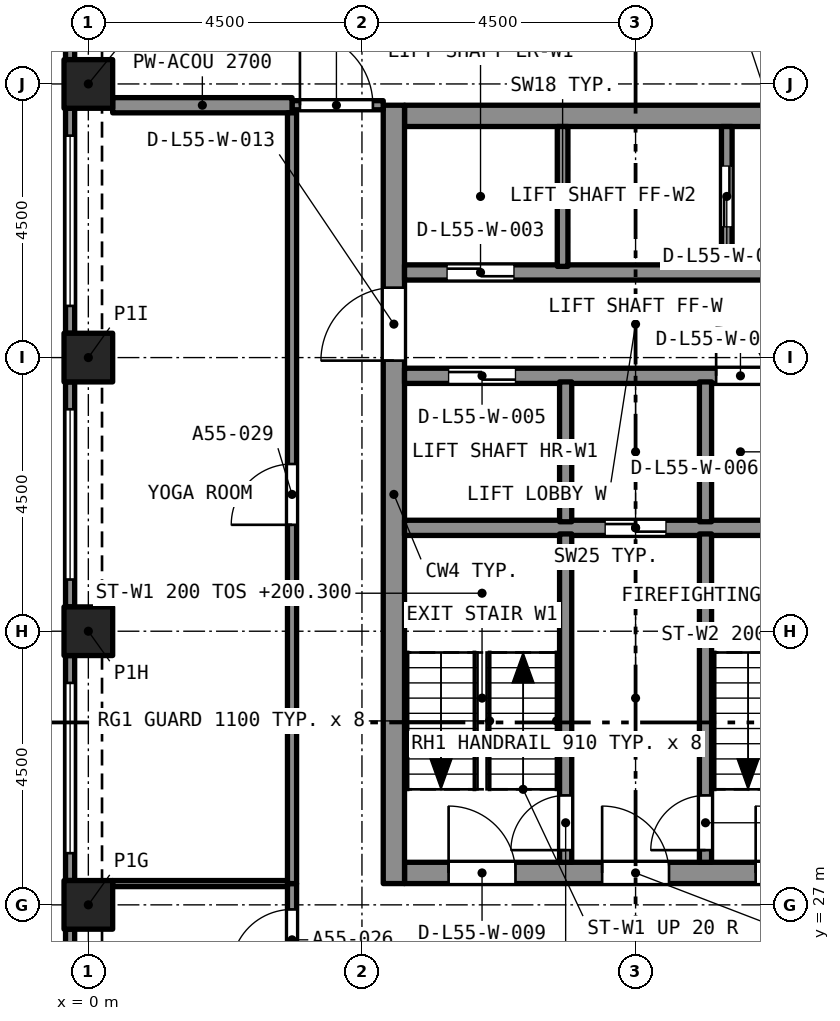
"""IFC4 building model, lengths in metres.
Left out: names, types, materials, properties, quantities, classifications, styles, units other than length and angle.
Written with IfcOpenShell. Run it as: python <this file> out.ifc"""

import sys

from ifc_helpers import new_model, si_unit, direction, frame, frame_2d, origin, origin_2d, place, context, subcontext, project, spatial, rectangle, extrude, element, fill, save


model = new_model("IFC4")
c1 = context("Model", 3, precision=1e-05, world=origin(), true_north=direction((0.0, 1.0)))
c2 = subcontext(c1, "Body", "Model", "MODEL_VIEW")
j1 = project(units=[si_unit("LENGTHUNIT", "METRE"), si_unit("PLANEANGLEUNIT", "RADIAN")], contexts=[c1])
p1 = place(None, origin())
s1 = spatial("IfcSite", under=j1, at=p1, CompositionType="ELEMENT")
p2 = place(p1, origin())
s2 = spatial("IfcBuilding", under=s1, at=p2, CompositionType="ELEMENT")
p3 = place(p2, frame((0.0, 0.0, 198.7)))
s3 = spatial("IfcBuildingStorey", under=s2, at=p3, CompositionType="ELEMENT", Elevation=198.7)
for number, where, z_axis, x_axis in (
    (1, (0.0, 27.0, 0.0), (0.0, 0.0, 1.0), (1.0, 0.0, 0.0)),
    (2, (0.0, 31.5, 0.0), (0.0, 0.0, 1.0), (1.0, 0.0, 0.0)),
    (3, (0.0, 36.0, 0.0), (0.0, 0.0, 1.0), (1.0, 0.0, 0.0)),
    (4, (0.0, 40.5, 0.0), (0.0, 0.0, 1.0), (1.0, 0.0, 0.0)),
):
    element("IfcColumn", number, at=place(p3, frame(where, z_axis=z_axis, x_axis=x_axis)), inside=s3, PredefinedType="COLUMN", context=c2, shape_type="SweptSolid", body=[
        extrude(rectangle(XDim=0.8, YDim=0.8, at=origin_2d()), origin(), (0.0, 0.0, 1.0), 3.2),
    ])
p4 = place(p3, frame((5.2, 27.525, 0.0), z_axis=(0.0, 0.0, 1.0), x_axis=(1.0, 0.0, 0.0)))
e5 = element("IfcWall", 5, at=p4, inside=s3, PredefinedType="SOLIDWALL", context=c2, shape_type="SweptSolid", body=[
    extrude(rectangle(XDim=7.6, YDim=0.35, at=frame_2d((3.8, 0.0))), origin(), (0.0, 0.0, 1.0), 3.2),
])
p5 = place(p4, frame((0.725, 0.0, 0.0)))
e6 = element("IfcOpeningElement", 6, at=p5, cuts=e5, PredefinedType="OPENING", context=c2, shape_type="SweptSolid", body=[
    extrude(rectangle(XDim=1.1, YDim=2.1, at=frame_2d((0.55, 1.05))), frame((0.0, 0.185, 0.0), z_axis=(0.0, -1.0, 0.0), x_axis=(1.0, 0.0, 0.0)), (0.0, 0.0, 1.0), 0.37),
])
p6 = place(p4, frame((3.25, 0.0, 0.0)))
e7 = element("IfcOpeningElement", 7, at=p6, cuts=e5, PredefinedType="OPENING", context=c2, shape_type="SweptSolid", body=[
    extrude(rectangle(XDim=1.1, YDim=2.1, at=frame_2d((0.55, 1.05))), frame((0.0, 0.185, 0.0), z_axis=(0.0, -1.0, 0.0), x_axis=(1.0, 0.0, 0.0)), (0.0, 0.0, 1.0), 0.37),
])
p7 = place(p4, frame((5.775, 0.0, 0.0)))
e8 = element("IfcOpeningElement", 8, at=p7, cuts=e5, PredefinedType="OPENING", context=c2, shape_type="SweptSolid", body=[
    extrude(rectangle(XDim=1.1, YDim=2.1, at=frame_2d((0.55, 1.05))), frame((0.0, 0.185, 0.0), z_axis=(0.0, -1.0, 0.0), x_axis=(1.0, 0.0, 0.0)), (0.0, 0.0, 1.0), 0.37),
])
p8 = place(p3, frame((5.2, 39.975, 0.0), z_axis=(0.0, 0.0, 1.0), x_axis=(1.0, 0.0, 0.0)))
e9 = element("IfcWall", 9, at=p8, inside=s3, PredefinedType="SOLIDWALL", context=c2, shape_type="SweptSolid", body=[
    extrude(rectangle(XDim=7.6, YDim=0.35, at=frame_2d((3.8, 0.0))), origin(), (0.0, 0.0, 1.0), 3.2),
])
p9 = place(p3, frame((5.025, 27.35, 0.0), z_axis=(0.0, 0.0, 1.0), x_axis=(0.0, 1.0, 0.0)))
e10 = element("IfcWall", 10, at=p9, inside=s3, PredefinedType="SOLIDWALL", context=c2, shape_type="SweptSolid", body=[
    extrude(rectangle(XDim=12.8, YDim=0.35, at=frame_2d((6.4, 0.0))), origin(), (0.0, 0.0, 1.0), 3.2),
])
p10 = place(p9, frame((8.6, 0.0, 0.0)))
e11 = element("IfcOpeningElement", 11, at=p10, cuts=e10, PredefinedType="OPENING", context=c2, shape_type="SweptSolid", body=[
    extrude(rectangle(XDim=1.2, YDim=2.1, at=frame_2d((0.6, 1.05))), frame((0.0, 0.185, 0.0), z_axis=(0.0, -1.0, 0.0), x_axis=(1.0, 0.0, 0.0)), (0.0, 0.0, 1.0), 0.37),
])
p11 = place(p3, frame((-0.3, 40.9, 0.0), z_axis=(0.0, 0.0, 1.0), x_axis=(0.0, 1.0, 0.0)))
e12 = element("IfcWall", 12, at=p11, inside=s3, PredefinedType="SOLIDWALL", context=c2, shape_type="SweptSolid", body=[
    extrude(rectangle(XDim=3.7, YDim=0.15, at=frame_2d((1.85, 0.0))), origin(), (0.0, 0.0, 1.0), 3.2),
])
p12 = place(p11, frame((0.45, 0.0, 0.45)))
e13 = element("IfcOpeningElement", 13, at=p12, cuts=e12, PredefinedType="OPENING", context=c2, shape_type="SweptSolid", body=[
    extrude(rectangle(XDim=2.8, YDim=1.95, at=frame_2d((1.4, 0.975))), frame((0.0, 0.085, 0.0), z_axis=(0.0, -1.0, 0.0), x_axis=(1.0, 0.0, 0.0)), (0.0, 0.0, 1.0), 0.17),
])
p13 = place(p3, frame((-0.3, 36.4, 0.0), z_axis=(0.0, 0.0, 1.0), x_axis=(0.0, 1.0, 0.0)))
e14 = element("IfcWall", 14, at=p13, inside=s3, PredefinedType="SOLIDWALL", context=c2, shape_type="SweptSolid", body=[
    extrude(rectangle(XDim=3.7, YDim=0.15, at=frame_2d((1.85, 0.0))), origin(), (0.0, 0.0, 1.0), 3.2),
])
p14 = place(p13, frame((0.45, 0.0, 0.45)))
e15 = element("IfcOpeningElement", 15, at=p14, cuts=e14, PredefinedType="OPENING", context=c2, shape_type="SweptSolid", body=[
    extrude(rectangle(XDim=2.8, YDim=1.95, at=frame_2d((1.4, 0.975))), frame((0.0, 0.085, 0.0), z_axis=(0.0, -1.0, 0.0), x_axis=(1.0, 0.0, 0.0)), (0.0, 0.0, 1.0), 0.17),
])
p15 = place(p3, frame((-0.3, 31.9, 0.0), z_axis=(0.0, 0.0, 1.0), x_axis=(0.0, 1.0, 0.0)))
e16 = element("IfcWall", 16, at=p15, inside=s3, PredefinedType="SOLIDWALL", context=c2, shape_type="SweptSolid", body=[
    extrude(rectangle(XDim=3.7, YDim=0.15, at=frame_2d((1.85, 0.0))), origin(), (0.0, 0.0, 1.0), 3.2),
])
p16 = place(p15, frame((0.45, 0.0, 0.45)))
e17 = element("IfcOpeningElement", 17, at=p16, cuts=e16, PredefinedType="OPENING", context=c2, shape_type="SweptSolid", body=[
    extrude(rectangle(XDim=2.8, YDim=1.95, at=frame_2d((1.4, 0.975))), frame((0.0, 0.085, 0.0), z_axis=(0.0, -1.0, 0.0), x_axis=(1.0, 0.0, 0.0)), (0.0, 0.0, 1.0), 0.17),
])
p17 = place(p3, frame((-0.3, 27.4, 0.0), z_axis=(0.0, 0.0, 1.0), x_axis=(0.0, 1.0, 0.0)))
e18 = element("IfcWall", 18, at=p17, inside=s3, PredefinedType="SOLIDWALL", context=c2, shape_type="SweptSolid", body=[
    extrude(rectangle(XDim=3.7, YDim=0.15, at=frame_2d((1.85, 0.0))), origin(), (0.0, 0.0, 1.0), 3.2),
])
p18 = place(p17, frame((0.45, 0.0, 0.45)))
e19 = element("IfcOpeningElement", 19, at=p18, cuts=e18, PredefinedType="OPENING", context=c2, shape_type="SweptSolid", body=[
    extrude(rectangle(XDim=2.8, YDim=1.95, at=frame_2d((1.4, 0.975))), frame((0.0, 0.085, 0.0), z_axis=(0.0, -1.0, 0.0), x_axis=(1.0, 0.0, 0.0)), (0.0, 0.0, 1.0), 0.17),
])
p19 = place(p3, frame((-0.3, 22.9, 0.0), z_axis=(0.0, 0.0, 1.0), x_axis=(0.0, 1.0, 0.0)))
e20 = element("IfcWall", 20, at=p19, inside=s3, PredefinedType="SOLIDWALL", context=c2, shape_type="SweptSolid", body=[
    extrude(rectangle(XDim=3.7, YDim=0.15, at=frame_2d((1.85, 0.0))), origin(), (0.0, 0.0, 1.0), 3.2),
])
p20 = place(p19, frame((0.45, 0.0, 0.45)))
e21 = element("IfcOpeningElement", 21, at=p20, cuts=e20, PredefinedType="OPENING", context=c2, shape_type="SweptSolid", body=[
    extrude(rectangle(XDim=2.8, YDim=1.95, at=frame_2d((1.4, 0.975))), frame((0.0, 0.085, 0.0), z_axis=(0.0, -1.0, 0.0), x_axis=(1.0, 0.0, 0.0)), (0.0, 0.0, 1.0), 0.17),
])
p21 = place(p3, frame((3.35, 40.15, 0.0), z_axis=(0.0, 0.0, 1.0), x_axis=(1.0, 0.0, 0.0)))
e22 = element("IfcWall", 22, at=p21, inside=s3, PredefinedType="PARTITIONING", context=c2, shape_type="SweptSolid", body=[
    extrude(rectangle(XDim=1.5, YDim=0.15, at=frame_2d((0.75, 0.0))), origin(), (0.0, 0.0, 1.0), 2.7),
])
p22 = place(p21, frame((0.13, 0.0, 0.0)))
e23 = element("IfcOpeningElement", 23, at=p22, cuts=e22, PredefinedType="OPENING", context=c2, shape_type="SweptSolid", body=[
    extrude(rectangle(XDim=1.2, YDim=2.4, at=frame_2d((0.6, 1.2))), frame((0.0, 0.085, 0.0), z_axis=(0.0, -1.0, 0.0), x_axis=(1.0, 0.0, 0.0)), (0.0, 0.0, 1.0), 0.17),
])
p23 = place(p3, frame((0.4, 40.15, 0.0), z_axis=(0.0, 0.0, 1.0), x_axis=(1.0, 0.0, 0.0)))
e24 = element("IfcWall", 24, at=p23, inside=s3, PredefinedType="PARTITIONING", context=c2, shape_type="SweptSolid", body=[
    extrude(rectangle(XDim=2.95, YDim=0.25, at=frame_2d((1.475, 0.0))), origin(), (0.0, 0.0, 1.0), 2.7),
])
p24 = place(p3, frame((3.35, 25.425, 0.0), z_axis=(0.0, 0.0, 1.0), x_axis=(0.0, 1.0, 0.0)))
e25 = element("IfcWall", 25, at=p24, inside=s3, PredefinedType="PARTITIONING", context=c2, shape_type="SweptSolid", body=[
    extrude(rectangle(XDim=1.925, YDim=0.15, at=frame_2d((0.962, 0.0))), origin(), (0.0, 0.0, 1.0), 2.7),
])
p25 = place(p24, frame((0.5, 0.0, 0.0)))
e26 = element("IfcOpeningElement", 26, at=p25, cuts=e25, PredefinedType="OPENING", context=c2, shape_type="SweptSolid", body=[
    extrude(rectangle(XDim=1.0, YDim=2.1, at=frame_2d((0.5, 1.05))), frame((0.0, 0.085, 0.0), z_axis=(0.0, -1.0, 0.0), x_axis=(1.0, 0.0, 0.0)), (0.0, 0.0, 1.0), 0.17),
])
p26 = place(p3, frame((3.35, 27.35, 0.0), z_axis=(0.0, 0.0, 1.0), x_axis=(0.0, 1.0, 0.0)))
e27 = element("IfcWall", 27, at=p26, inside=s3, PredefinedType="PARTITIONING", context=c2, shape_type="SweptSolid", body=[
    extrude(rectangle(XDim=12.675, YDim=0.15, at=frame_2d((6.337, 0.0))), origin(), (0.0, 0.0, 1.0), 2.7),
])
p27 = place(p26, frame((5.9, 0.0, 0.0)))
e28 = element("IfcOpeningElement", 28, at=p27, cuts=e27, PredefinedType="OPENING", context=c2, shape_type="SweptSolid", body=[
    extrude(rectangle(XDim=1.0, YDim=2.1, at=frame_2d((0.5, 1.05))), frame((0.0, 0.085, 0.0), z_axis=(0.0, -1.0, 0.0), x_axis=(1.0, 0.0, 0.0)), (0.0, 0.0, 1.0), 0.17),
])
p28 = place(p3, frame((0.4, 27.35, 0.0), z_axis=(0.0, 0.0, 1.0), x_axis=(1.0, 0.0, 0.0)))
e29 = element("IfcWall", 29, at=p28, inside=s3, PredefinedType="PARTITIONING", context=c2, shape_type="SweptSolid", body=[
    extrude(rectangle(XDim=2.875, YDim=0.1, at=frame_2d((1.438, 0.0))), origin(), (0.0, 0.0, 1.0), 2.7),
])
p29 = place(p3, frame((5.2, 33.2, 0.0), z_axis=(0.0, 0.0, 1.0), x_axis=(1.0, 0.0, 0.0)))
e30 = element("IfcWall", 30, at=p29, inside=s3, PredefinedType="SOLIDWALL", context=c2, shape_type="SweptSolid", body=[
    extrude(rectangle(XDim=7.6, YDim=0.25, at=frame_2d((3.8, 0.0))), origin(), (0.0, 0.0, 1.0), 2.7),
])
p30 = place(p29, frame((3.3, 0.0, 0.0)))
e31 = element("IfcOpeningElement", 31, at=p30, cuts=e30, PredefinedType="OPENING", context=c2, shape_type="SweptSolid", body=[
    extrude(rectangle(XDim=1.0, YDim=2.1, at=frame_2d((0.5, 1.05))), frame((0.0, 0.135, 0.0), z_axis=(0.0, -1.0, 0.0), x_axis=(1.0, 0.0, 0.0)), (0.0, 0.0, 1.0), 0.27),
])
p31 = place(p3, frame((5.2, 35.7, 0.0), z_axis=(0.0, 0.0, 1.0), x_axis=(1.0, 0.0, 0.0)))
e32 = element("IfcWall", 32, at=p31, inside=s3, PredefinedType="SOLIDWALL", context=c2, shape_type="SweptSolid", body=[
    extrude(rectangle(XDim=7.6, YDim=0.25, at=frame_2d((3.8, 0.0))), origin(), (0.0, 0.0, 1.0), 2.7),
])
p32 = place(p31, frame((0.725, 0.0, 0.0)))
e33 = element("IfcOpeningElement", 33, at=p32, cuts=e32, PredefinedType="OPENING", context=c2, shape_type="SweptSolid", body=[
    extrude(rectangle(XDim=1.1, YDim=2.4, at=frame_2d((0.55, 1.2))), frame((0.0, 0.135, 0.0), z_axis=(0.0, -1.0, 0.0), x_axis=(1.0, 0.0, 0.0)), (0.0, 0.0, 1.0), 0.27),
])
p33 = place(p31, frame((5.125, 0.0, 0.0)))
e34 = element("IfcOpeningElement", 34, at=p33, cuts=e32, PredefinedType="OPENING", context=c2, shape_type="SweptSolid", body=[
    extrude(rectangle(XDim=0.8, YDim=2.1, at=frame_2d((0.4, 1.05))), frame((0.0, 0.135, 0.0), z_axis=(0.0, -1.0, 0.0), x_axis=(1.0, 0.0, 0.0)), (0.0, 0.0, 1.0), 0.27),
])
p34 = place(p31, frame((6.45, 0.0, 0.0)))
e35 = element("IfcOpeningElement", 35, at=p34, cuts=e32, PredefinedType="OPENING", context=c2, shape_type="SweptSolid", body=[
    extrude(rectangle(XDim=0.9, YDim=2.1, at=frame_2d((0.45, 1.05))), frame((0.0, 0.135, 0.0), z_axis=(0.0, -1.0, 0.0), x_axis=(1.0, 0.0, 0.0)), (0.0, 0.0, 1.0), 0.27),
])
p35 = place(p3, frame((5.2, 37.4, 0.0), z_axis=(0.0, 0.0, 1.0), x_axis=(1.0, 0.0, 0.0)))
e36 = element("IfcWall", 36, at=p35, inside=s3, PredefinedType="SOLIDWALL", context=c2, shape_type="SweptSolid", body=[
    extrude(rectangle(XDim=7.6, YDim=0.25, at=frame_2d((3.8, 0.0))), origin(), (0.0, 0.0, 1.0), 2.7),
])
p36 = place(p35, frame((0.7, 0.0, 0.0)))
e37 = element("IfcOpeningElement", 37, at=p36, cuts=e36, PredefinedType="OPENING", context=c2, shape_type="SweptSolid", body=[
    extrude(rectangle(XDim=1.1, YDim=2.4, at=frame_2d((0.55, 1.2))), frame((0.0, 0.135, 0.0), z_axis=(0.0, -1.0, 0.0), x_axis=(1.0, 0.0, 0.0)), (0.0, 0.0, 1.0), 0.27),
])
p37 = place(p3, frame((7.85, 27.7, 0.0), z_axis=(0.0, 0.0, 1.0), x_axis=(0.0, 1.0, 0.0)))
e38 = element("IfcWall", 38, at=p37, inside=s3, PredefinedType="SOLIDWALL", context=c2, shape_type="SweptSolid", body=[
    extrude(rectangle(XDim=5.4, YDim=0.2, at=frame_2d((2.7, 0.0))), origin(), (0.0, 0.0, 1.0), 2.7),
])
p38 = place(p37, frame((0.2, 0.0, 0.0)))
e39 = element("IfcOpeningElement", 39, at=p38, cuts=e38, PredefinedType="OPENING", context=c2, shape_type="SweptSolid", body=[
    extrude(rectangle(XDim=0.9, YDim=2.1, at=frame_2d((0.45, 1.05))), frame((0.0, 0.11, 0.0), z_axis=(0.0, -1.0, 0.0), x_axis=(1.0, 0.0, 0.0)), (0.0, 0.0, 1.0), 0.22),
])
p39 = place(p3, frame((10.15, 27.7, 0.0), z_axis=(0.0, 0.0, 1.0), x_axis=(0.0, 1.0, 0.0)))
e40 = element("IfcWall", 40, at=p39, inside=s3, PredefinedType="SOLIDWALL", context=c2, shape_type="SweptSolid", body=[
    extrude(rectangle(XDim=5.4, YDim=0.2, at=frame_2d((2.7, 0.0))), origin(), (0.0, 0.0, 1.0), 2.7),
])
p40 = place(p39, frame((0.2, 0.0, 0.0)))
e41 = element("IfcOpeningElement", 41, at=p40, cuts=e40, PredefinedType="OPENING", context=c2, shape_type="SweptSolid", body=[
    extrude(rectangle(XDim=0.9, YDim=2.1, at=frame_2d((0.45, 1.05))), frame((0.0, 0.11, 0.0), z_axis=(0.0, -1.0, 0.0), x_axis=(1.0, 0.0, 0.0)), (0.0, 0.0, 1.0), 0.22),
])
for number, where, z_axis, x_axis in (
    (42, (7.85, 33.3, 0.0), (0.0, 0.0, 1.0), (0.0, 1.0, 0.0)),
    (43, (10.15, 33.3, 0.0), (0.0, 0.0, 1.0), (0.0, 1.0, 0.0)),
):
    element("IfcWall", number, at=place(p3, frame(where, z_axis=z_axis, x_axis=x_axis)), inside=s3, PredefinedType="SOLIDWALL", context=c2, shape_type="SweptSolid", body=[
        extrude(rectangle(XDim=2.3, YDim=0.2, at=frame_2d((1.15, 0.0))), origin(), (0.0, 0.0, 1.0), 2.7),
    ])
p41 = place(p3, frame((7.8, 37.5, 0.0), z_axis=(0.0, 0.0, 1.0), x_axis=(0.0, 1.0, 0.0)))
e44 = element("IfcWall", 44, at=p41, inside=s3, PredefinedType="SOLIDWALL", context=c2, shape_type="SweptSolid", body=[
    extrude(rectangle(XDim=2.3, YDim=0.175, at=frame_2d((1.15, 0.0))), origin(), (0.0, 0.0, 1.0), 2.7),
])
p42 = place(p3, frame((10.5, 37.5, 0.0), z_axis=(0.0, 0.0, 1.0), x_axis=(0.0, 1.0, 0.0)))
e45 = element("IfcWall", 45, at=p42, inside=s3, PredefinedType="SOLIDWALL", context=c2, shape_type="SweptSolid", body=[
    extrude(rectangle(XDim=2.3, YDim=0.175, at=frame_2d((1.15, 0.0))), origin(), (0.0, 0.0, 1.0), 2.7),
])
p43 = place(p42, frame((0.65, 0.0, 0.0)))
e46 = element("IfcOpeningElement", 46, at=p43, cuts=e45, PredefinedType="OPENING", context=c2, shape_type="SweptSolid", body=[
    extrude(rectangle(XDim=1.0, YDim=2.1, at=frame_2d((0.5, 1.05))), frame((0.0, 0.097, 0.0), z_axis=(0.0, -1.0, 0.0), x_axis=(1.0, 0.0, 0.0)), (0.0, 0.0, 1.0), 0.195),
])
p44 = place(p14, origin())
e47 = element("IfcWindow", 47, at=p44, inside=s3, PartitioningType="SINGLE_PANEL", PredefinedType="WINDOW", context=c2, shape_type="SweptSolid", body=[
    extrude(rectangle(XDim=2.8, YDim=1.95, at=frame_2d((1.4, 0.975))), frame((0.0, 0.03, 0.0), z_axis=(0.0, -1.0, 0.0), x_axis=(1.0, 0.0, 0.0)), (0.0, 0.0, 1.0), 0.06),
])
fill(e15, e47)
p45 = place(p16, origin())
e48 = element("IfcWindow", 48, at=p45, inside=s3, PartitioningType="SINGLE_PANEL", PredefinedType="WINDOW", context=c2, shape_type="SweptSolid", body=[
    extrude(rectangle(XDim=2.8, YDim=1.95, at=frame_2d((1.4, 0.975))), frame((0.0, 0.03, 0.0), z_axis=(0.0, -1.0, 0.0), x_axis=(1.0, 0.0, 0.0)), (0.0, 0.0, 1.0), 0.06),
])
fill(e17, e48)
p46 = place(p18, origin())
e49 = element("IfcWindow", 49, at=p46, inside=s3, PartitioningType="SINGLE_PANEL", PredefinedType="WINDOW", context=c2, shape_type="SweptSolid", body=[
    extrude(rectangle(XDim=2.8, YDim=1.95, at=frame_2d((1.4, 0.975))), frame((0.0, 0.03, 0.0), z_axis=(0.0, -1.0, 0.0), x_axis=(1.0, 0.0, 0.0)), (0.0, 0.0, 1.0), 0.06),
])
fill(e19, e49)
p47 = place(p22, origin())
e50 = element("IfcDoor", 50, at=p47, inside=s3, OperationType="SINGLE_SWING_LEFT", PredefinedType="DOOR", context=c2, shape_type="SweptSolid", body=[
    extrude(rectangle(XDim=1.2, YDim=2.4, at=frame_2d((0.6, 1.2))), frame((0.0, 0.025, 0.0), z_axis=(0.0, -1.0, 0.0), x_axis=(1.0, 0.0, 0.0)), (0.0, 0.0, 1.0), 0.05),
])
fill(e23, e50)
p48 = place(p25, origin())
e51 = element("IfcDoor", 51, at=p48, inside=s3, OperationType="SINGLE_SWING_RIGHT", PredefinedType="DOOR", context=c2, shape_type="SweptSolid", body=[
    extrude(rectangle(XDim=1.0, YDim=2.1, at=frame_2d((0.5, 1.05))), frame((0.0, 0.025, 0.0), z_axis=(0.0, -1.0, 0.0), x_axis=(1.0, 0.0, 0.0)), (0.0, 0.0, 1.0), 0.05),
])
fill(e26, e51)
p49 = place(p27, origin())
e52 = element("IfcDoor", 52, at=p49, inside=s3, OperationType="SINGLE_SWING_RIGHT", PredefinedType="DOOR", context=c2, shape_type="SweptSolid", body=[
    extrude(rectangle(XDim=1.0, YDim=2.1, at=frame_2d((0.5, 1.05))), frame((0.0, 0.025, 0.0), z_axis=(0.0, -1.0, 0.0), x_axis=(1.0, 0.0, 0.0)), (0.0, 0.0, 1.0), 0.05),
])
fill(e28, e52)
p50 = place(p38, origin())
e53 = element("IfcDoor", 53, at=p50, inside=s3, OperationType="SINGLE_SWING_LEFT", PredefinedType="DOOR", context=c2, shape_type="SweptSolid", body=[
    extrude(rectangle(XDim=0.9, YDim=2.1, at=frame_2d((0.45, 1.05))), frame((0.0, 0.025, 0.0), z_axis=(0.0, -1.0, 0.0), x_axis=(1.0, 0.0, 0.0)), (0.0, 0.0, 1.0), 0.05),
])
fill(e39, e53)
p51 = place(p40, origin())
e54 = element("IfcDoor", 54, at=p51, inside=s3, OperationType="SINGLE_SWING_LEFT", PredefinedType="DOOR", context=c2, shape_type="SweptSolid", body=[
    extrude(rectangle(XDim=0.9, YDim=2.1, at=frame_2d((0.45, 1.05))), frame((0.0, 0.025, 0.0), z_axis=(0.0, -1.0, 0.0), x_axis=(1.0, 0.0, 0.0)), (0.0, 0.0, 1.0), 0.05),
])
fill(e41, e54)
p52 = place(p36, origin())
e55 = element("IfcDoor", 55, at=p52, inside=s3, OperationType="SLIDING_TO_LEFT", PredefinedType="DOOR", context=c2, shape_type="SweptSolid", body=[
    extrude(rectangle(XDim=1.1, YDim=2.4, at=frame_2d((0.55, 1.2))), frame((0.0, 0.025, 0.0), z_axis=(0.0, -1.0, 0.0), x_axis=(1.0, 0.0, 0.0)), (0.0, 0.0, 1.0), 0.05),
])
fill(e37, e55)
p53 = place(p43, origin())
e56 = element("IfcDoor", 56, at=p53, inside=s3, OperationType="SLIDING_TO_LEFT", PredefinedType="DOOR", context=c2, shape_type="SweptSolid", body=[
    extrude(rectangle(XDim=1.0, YDim=2.1, at=frame_2d((0.5, 1.05))), frame((0.0, 0.025, 0.0), z_axis=(0.0, -1.0, 0.0), x_axis=(1.0, 0.0, 0.0)), (0.0, 0.0, 1.0), 0.05),
])
fill(e46, e56)
p54 = place(p32, origin())
e57 = element("IfcDoor", 57, at=p54, inside=s3, OperationType="SLIDING_TO_LEFT", PredefinedType="DOOR", context=c2, shape_type="SweptSolid", body=[
    extrude(rectangle(XDim=1.1, YDim=2.4, at=frame_2d((0.55, 1.2))), frame((0.0, 0.025, 0.0), z_axis=(0.0, -1.0, 0.0), x_axis=(1.0, 0.0, 0.0)), (0.0, 0.0, 1.0), 0.05),
])
fill(e33, e57)
p55 = place(p30, origin())
e58 = element("IfcDoor", 58, at=p55, inside=s3, OperationType="SLIDING_TO_LEFT", PredefinedType="DOOR", context=c2, shape_type="SweptSolid", body=[
    extrude(rectangle(XDim=1.0, YDim=2.1, at=frame_2d((0.5, 1.05))), frame((0.0, 0.025, 0.0), z_axis=(0.0, -1.0, 0.0), x_axis=(1.0, 0.0, 0.0)), (0.0, 0.0, 1.0), 0.05),
])
fill(e31, e58)
p56 = place(p33, origin())
e59 = element("IfcDoor", 59, at=p56, inside=s3, OperationType="SINGLE_SWING_LEFT", PredefinedType="DOOR", context=c2, shape_type="SweptSolid", body=[
    extrude(rectangle(XDim=0.8, YDim=2.1, at=frame_2d((0.4, 1.05))), frame((0.0, 0.025, 0.0), z_axis=(0.0, -1.0, 0.0), x_axis=(1.0, 0.0, 0.0)), (0.0, 0.0, 1.0), 0.05),
])
fill(e34, e59)
p57 = place(p5, origin())
e60 = element("IfcDoor", 60, at=p57, inside=s3, OperationType="SINGLE_SWING_LEFT", PredefinedType="DOOR", context=c2, shape_type="SweptSolid", body=[
    extrude(rectangle(XDim=1.1, YDim=2.1, at=frame_2d((0.55, 1.05))), frame((0.0, 0.025, 0.0), z_axis=(0.0, -1.0, 0.0), x_axis=(1.0, 0.0, 0.0)), (0.0, 0.0, 1.0), 0.05),
])
fill(e6, e60)
p58 = place(p6, origin())
e61 = element("IfcDoor", 61, at=p58, inside=s3, OperationType="SINGLE_SWING_LEFT", PredefinedType="DOOR", context=c2, shape_type="SweptSolid", body=[
    extrude(rectangle(XDim=1.1, YDim=2.1, at=frame_2d((0.55, 1.05))), frame((0.0, 0.025, 0.0), z_axis=(0.0, -1.0, 0.0), x_axis=(1.0, 0.0, 0.0)), (0.0, 0.0, 1.0), 0.05),
])
fill(e7, e61)
p59 = place(p7, origin())
e62 = element("IfcDoor", 62, at=p59, inside=s3, OperationType="SINGLE_SWING_LEFT", PredefinedType="DOOR", context=c2, shape_type="SweptSolid", body=[
    extrude(rectangle(XDim=1.1, YDim=2.1, at=frame_2d((0.55, 1.05))), frame((0.0, 0.025, 0.0), z_axis=(0.0, -1.0, 0.0), x_axis=(1.0, 0.0, 0.0)), (0.0, 0.0, 1.0), 0.05),
])
fill(e8, e62)
p60 = place(p10, origin())
e63 = element("IfcDoor", 63, at=p60, inside=s3, OperationType="SINGLE_SWING_LEFT", PredefinedType="DOOR", context=c2, shape_type="SweptSolid", body=[
    extrude(rectangle(XDim=1.2, YDim=2.1, at=frame_2d((0.6, 1.05))), frame((0.0, 0.025, 0.0), z_axis=(0.0, -1.0, 0.0), x_axis=(1.0, 0.0, 0.0)), (0.0, 0.0, 1.0), 0.05),
])
fill(e11, e63)
save(model, sys.argv[1])
